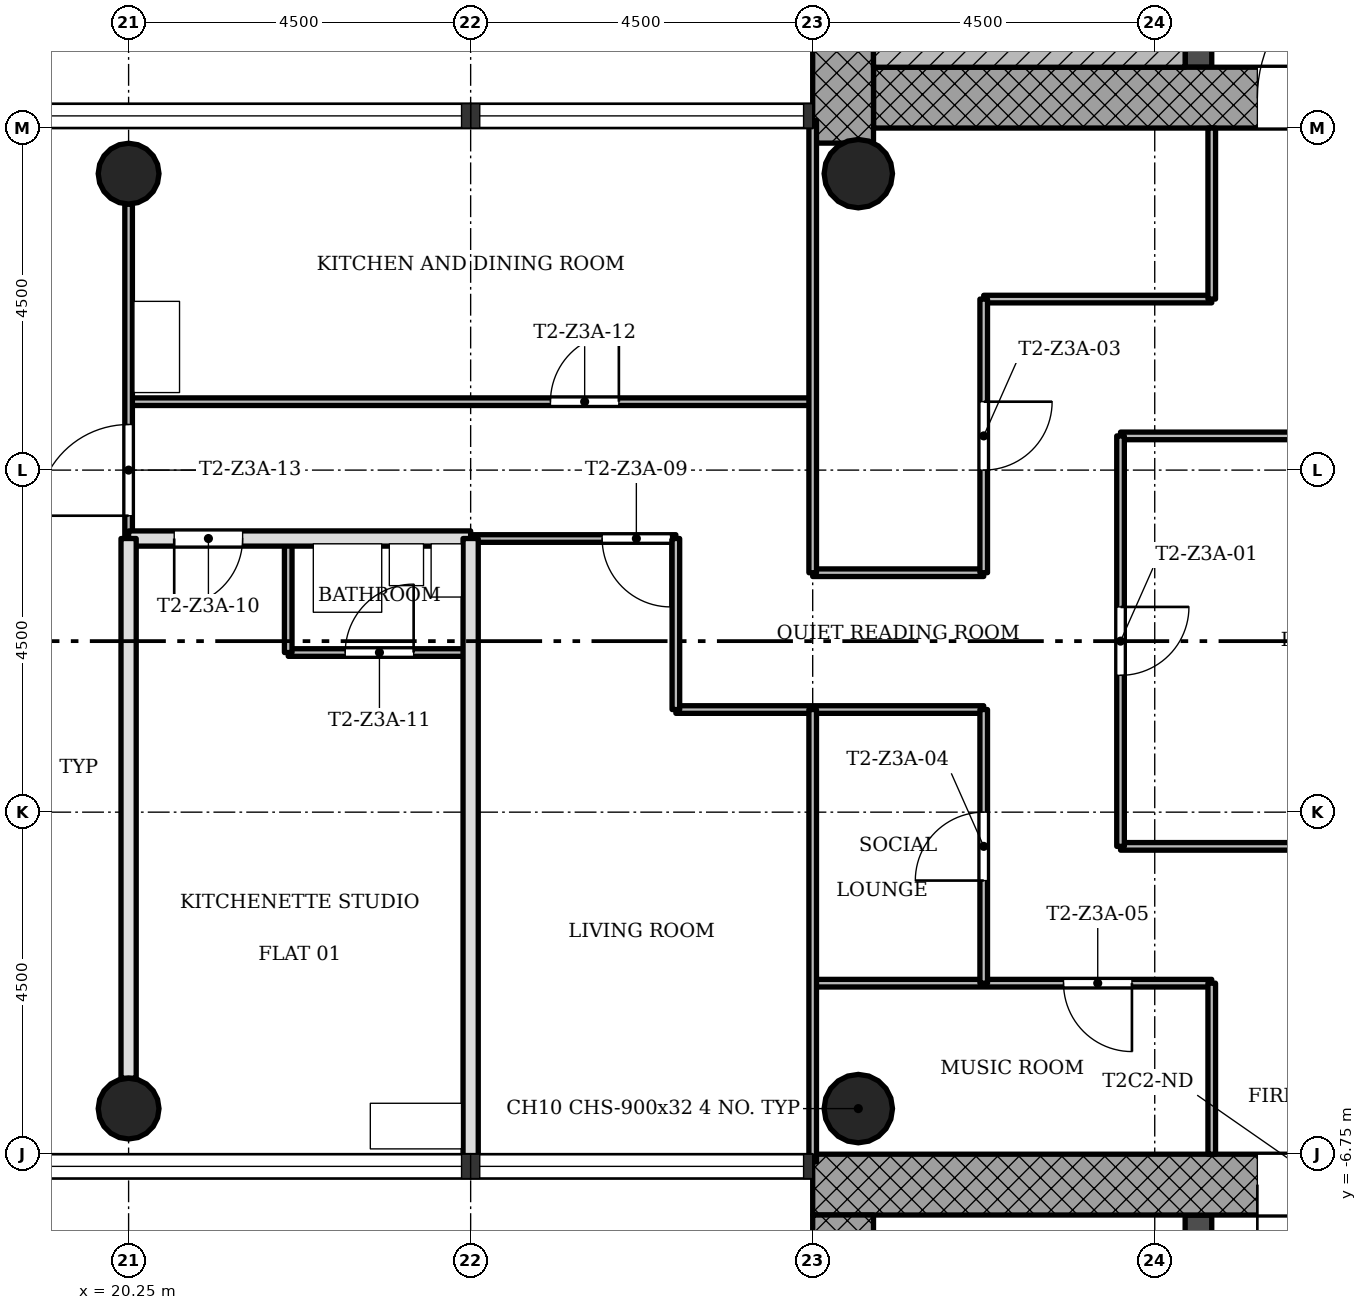
"""IFC4 building model, lengths in metres.
Left out: names, types, materials, properties, quantities, classifications, styles, units other than length and angle.
Written with IfcOpenShell. Run it as: python <this file> out.ifc"""

import sys

from ifc_helpers import new_model, si_unit, direction, frame, frame_2d, origin, origin_2d, place, context, subcontext, project, spatial, rectangle, hollow_circle, extrude, element, fill, save


model = new_model("IFC4")
c1 = context("Model", 3, precision=1e-05, world=origin(), true_north=direction((0.0, 1.0)))
c2 = subcontext(c1, "Body", "Model", "MODEL_VIEW")
j1 = project(units=[si_unit("LENGTHUNIT", "METRE"), si_unit("PLANEANGLEUNIT", "RADIAN")], contexts=[c1])
p1 = place(None, origin())
s1 = spatial("IfcSite", under=j1, at=p1, CompositionType="ELEMENT")
p2 = place(p1, origin())
s2 = spatial("IfcBuilding", under=s1, at=p2, CompositionType="ELEMENT")
p3 = place(p2, frame((0.0, 0.0, 133.7)))
s3 = spatial("IfcBuildingStorey", under=s2, at=p3, CompositionType="ELEMENT", Elevation=133.7)
p4 = place(p3, frame((30.05, 7.15, 0.0), z_axis=(0.0, 0.0, 1.0), x_axis=(1.0, 0.0, 0.0)))
e1 = element("IfcWall", 1, at=p4, inside=s3, PredefinedType="SHEAR", context=c2, shape_type="SweptSolid", body=[
    extrude(rectangle(XDim=12.7, YDim=0.8, at=frame_2d((6.35, 0.0))), origin(), (0.0, 0.0, 1.0), 3.4),
])
p5 = place(p4, frame((5.05, 0.0, 0.0)))
e2 = element("IfcOpeningElement", 2, at=p5, cuts=e1, PredefinedType="OPENING", context=c2, shape_type="SweptSolid", body=[
    extrude(rectangle(XDim=1.8, YDim=2.1, at=frame_2d((0.9, 1.05))), frame((0.0, 0.41, 0.0), z_axis=(0.0, -1.0, 0.0), x_axis=(1.0, 0.0, 0.0)), (0.0, 0.0, 1.0), 0.82),
])
p6 = place(p3, frame((29.65, 15.348, 0.0), z_axis=(0.0, 0.0, 1.0), x_axis=(0.0, -1.0, 0.0)))
e3 = element("IfcWall", 3, at=p6, inside=s3, PredefinedType="SHEAR", context=c2, shape_type="SweptSolid", body=[
    extrude(rectangle(XDim=8.796, YDim=0.8, at=frame_2d((4.398, 0.0))), origin(), (0.0, 0.0, 1.0), 3.4),
])
p7 = place(p3, frame((34.325, 7.55, 0.0), z_axis=(0.0, 0.0, 1.0), x_axis=(0.0, 1.0, 0.0)))
e4 = element("IfcWall", 4, at=p7, inside=s3, PredefinedType="SHEAR", context=c2, shape_type="SweptSolid", body=[
    extrude(rectangle(XDim=7.4, YDim=0.35, at=frame_2d((3.7, 0.0))), origin(), (0.0, 0.0, 1.0), 3.4),
])
p8 = place(p7, frame((0.85, 0.0, 0.0)))
e5 = element("IfcOpeningElement", 5, at=p8, cuts=e4, PredefinedType="OPENING", context=c2, shape_type="SweptSolid", body=[
    extrude(rectangle(XDim=0.9, YDim=2.1, at=frame_2d((0.45, 1.05))), frame((0.0, 0.185, 0.0), z_axis=(0.0, -1.0, 0.0), x_axis=(1.0, 0.0, 0.0)), (0.0, 0.0, 1.0), 0.37),
])
p9 = place(p3, frame((41.95, -7.15, 0.0), z_axis=(0.0, 0.0, 1.0), x_axis=(-1.0, 0.0, 0.0)))
e6 = element("IfcWall", 6, at=p9, inside=s3, PredefinedType="SHEAR", context=c2, shape_type="SweptSolid", body=[
    extrude(rectangle(XDim=12.7, YDim=0.8, at=frame_2d((6.35, 0.0))), origin(), (0.0, 0.0, 1.0), 3.4),
])
p10 = place(p9, frame((5.05, 0.0, 0.0)))
e7 = element("IfcOpeningElement", 7, at=p10, cuts=e6, PredefinedType="OPENING", context=c2, shape_type="SweptSolid", body=[
    extrude(rectangle(XDim=1.8, YDim=2.1, at=frame_2d((0.9, 1.05))), frame((0.0, 0.41, 0.0), z_axis=(0.0, -1.0, 0.0), x_axis=(1.0, 0.0, 0.0)), (0.0, 0.0, 1.0), 0.82),
])
p11 = place(p3, frame((29.65, -7.55, 0.0), z_axis=(0.0, 0.0, 1.0), x_axis=(0.0, -1.0, 0.0)))
e8 = element("IfcWall", 8, at=p11, inside=s3, PredefinedType="SHEAR", context=c2, shape_type="SweptSolid", body=[
    extrude(rectangle(XDim=8.2, YDim=0.8, at=frame_2d((4.1, 0.0))), origin(), (0.0, 0.0, 1.0), 3.4),
])
p12 = place(p3, frame((34.325, -14.95, 0.0), z_axis=(0.0, 0.0, 1.0), x_axis=(0.0, 1.0, 0.0)))
e9 = element("IfcWall", 9, at=p12, inside=s3, PredefinedType="SHEAR", context=c2, shape_type="SweptSolid", body=[
    extrude(rectangle(XDim=7.4, YDim=0.35, at=frame_2d((3.7, 0.0))), origin(), (0.0, 0.0, 1.0), 3.4),
])
p13 = place(p12, frame((5.35, 0.0, 0.0)))
e10 = element("IfcOpeningElement", 10, at=p13, cuts=e9, PredefinedType="OPENING", context=c2, shape_type="SweptSolid", body=[
    extrude(rectangle(XDim=1.1, YDim=2.1, at=frame_2d((0.55, 1.05))), frame((0.0, 0.185, 0.0), z_axis=(0.0, -1.0, 0.0), x_axis=(1.0, 0.0, 0.0)), (0.0, 0.0, 1.0), 0.37),
])
p14 = place(p12, frame((1.0, 0.0, 0.0)))
e11 = element("IfcOpeningElement", 11, at=p14, cuts=e9, PredefinedType="OPENING", context=c2, shape_type="SweptSolid", body=[
    extrude(rectangle(XDim=1.1, YDim=2.1, at=frame_2d((0.55, 1.05))), frame((0.0, 0.185, 0.0), z_axis=(0.0, -1.0, 0.0), x_axis=(1.0, 0.0, 0.0)), (0.0, 0.0, 1.0), 0.37),
])
for number, where, z_axis, x_axis in (
    (12, (20.25, 6.15, 0.0), (0.0, 0.0, 1.0), (1.0, 0.0, 0.0)),
    (13, (20.25, -6.15, 0.0), (0.0, 0.0, 1.0), (1.0, 0.0, 0.0)),
):
    element("IfcColumn", number, at=place(p3, frame(where, z_axis=z_axis, x_axis=x_axis)), inside=s3, PredefinedType="COLUMN", context=c2, shape_type="SweptSolid", body=[
        extrude(hollow_circle(Radius=0.4, WallThickness=0.028, at=origin_2d()), origin(), (0.0, 0.0, 1.0), 3.4),
    ])
for number, where, z_axis, x_axis in (
    (14, (29.85, 6.15, 0.0), (0.0, 0.0, 1.0), (1.0, 0.0, 0.0)),
    (15, (29.85, -6.15, 0.0), (0.0, 0.0, 1.0), (1.0, 0.0, 0.0)),
):
    element("IfcColumn", number, at=place(p3, frame(where, z_axis=z_axis, x_axis=x_axis)), inside=s3, PredefinedType="COLUMN", context=c2, shape_type="SweptSolid", body=[
        extrude(hollow_circle(Radius=0.45, WallThickness=0.032, at=origin_2d()), origin(), (0.0, 0.0, 1.0), 3.4),
    ])
p15 = place(p3, frame((34.5, -4.5, 0.0), z_axis=(0.0, 0.0, 1.0), x_axis=(-1.0, 0.0, 0.0)))
e16 = element("IfcWall", 16, at=p15, inside=s3, PredefinedType="PARTITIONING", context=c2, shape_type="SweptSolid", body=[
    extrude(rectangle(XDim=5.25, YDim=0.1, at=frame_2d((2.625, 0.0))), origin(), (0.0, 0.0, 1.0), 3.0),
])
p16 = place(p15, frame((1.05, 0.0, 0.0)))
e17 = element("IfcOpeningElement", 17, at=p16, cuts=e16, PredefinedType="OPENING", context=c2, shape_type="SweptSolid", body=[
    extrude(rectangle(XDim=0.9, YDim=2.1, at=frame_2d((0.45, 1.05))), frame((0.0, 0.06, 0.0), z_axis=(0.0, -1.0, 0.0), x_axis=(1.0, 0.0, 0.0)), (0.0, 0.0, 1.0), 0.12),
])
p17 = place(p3, frame((38.7, -2.7, 0.0), z_axis=(0.0, 0.0, 1.0), x_axis=(-1.0, 0.0, 0.0)))
e18 = element("IfcWall", 18, at=p17, inside=s3, PredefinedType="PARTITIONING", context=c2, shape_type="SweptSolid", body=[
    extrude(rectangle(XDim=5.4, YDim=0.1, at=frame_2d((2.7, 0.0))), origin(), (0.0, 0.0, 1.0), 3.0),
])
p18 = place(p3, frame((31.5, -0.9, 0.0), z_axis=(0.0, 0.0, 1.0), x_axis=(-1.0, 0.0, 0.0)))
e19 = element("IfcWall", 19, at=p18, inside=s3, PredefinedType="PARTITIONING", context=c2, shape_type="SweptSolid", body=[
    extrude(rectangle(XDim=4.05, YDim=0.1, at=frame_2d((2.025, 0.0))), origin(), (0.0, 0.0, 1.0), 3.0),
])
p19 = place(p3, frame((24.75, -0.15, 0.0), z_axis=(0.0, 0.0, 1.0), x_axis=(-1.0, 0.0, 0.0)))
e20 = element("IfcWall", 20, at=p19, inside=s3, PredefinedType="PARTITIONING", context=c2, shape_type="SweptSolid", body=[
    extrude(rectangle(XDim=2.4, YDim=0.1, at=frame_2d((1.2, 0.0))), origin(), (0.0, 0.0, 1.0), 3.0),
])
p20 = place(p19, frame((0.75, 0.0, 0.0)))
e21 = element("IfcOpeningElement", 21, at=p20, cuts=e20, PredefinedType="OPENING", context=c2, shape_type="SweptSolid", body=[
    extrude(rectangle(XDim=0.9, YDim=2.1, at=frame_2d((0.45, 1.05))), frame((0.0, 0.06, 0.0), z_axis=(0.0, -1.0, 0.0), x_axis=(1.0, 0.0, 0.0)), (0.0, 0.0, 1.0), 0.12),
])
p21 = place(p3, frame((31.5, 0.9, 0.0), z_axis=(0.0, 0.0, 1.0), x_axis=(-1.0, 0.0, 0.0)))
e22 = element("IfcWall", 22, at=p21, inside=s3, PredefinedType="PARTITIONING", context=c2, shape_type="SweptSolid", body=[
    extrude(rectangle(XDim=2.25, YDim=0.1, at=frame_2d((1.125, 0.0))), origin(), (0.0, 0.0, 1.0), 3.0),
])
p22 = place(p3, frame((27.45, 1.35, 0.0), z_axis=(0.0, 0.0, 1.0), x_axis=(-1.0, 0.0, 0.0)))
e23 = element("IfcWall", 23, at=p22, inside=s3, PredefinedType="PARTITIONING", context=c2, shape_type="SweptSolid", body=[
    extrude(rectangle(XDim=2.7, YDim=0.1, at=frame_2d((1.35, 0.0))), origin(), (0.0, 0.0, 1.0), 3.0),
])
p23 = place(p22, frame((0.07, 0.0, 0.0)))
e24 = element("IfcOpeningElement", 24, at=p23, cuts=e23, PredefinedType="OPENING", context=c2, shape_type="SweptSolid", body=[
    extrude(rectangle(XDim=0.9, YDim=2.1, at=frame_2d((0.45, 1.05))), frame((0.0, 0.06, 0.0), z_axis=(0.0, -1.0, 0.0), x_axis=(1.0, 0.0, 0.0)), (0.0, 0.0, 1.0), 0.12),
])
p24 = place(p3, frame((24.75, 1.35, 0.0), z_axis=(0.0, 0.0, 1.0), x_axis=(-1.0, 0.0, 0.0)))
e25 = element("IfcWall", 25, at=p24, inside=s3, PredefinedType="SOLIDWALL", context=c2, shape_type="SweptSolid", body=[
    extrude(rectangle(XDim=4.5, YDim=0.2, at=frame_2d((2.25, 0.0))), origin(), (0.0, 0.0, 1.0), 3.0),
])
p25 = place(p24, frame((3.0, 0.0, 0.0)))
e26 = element("IfcOpeningElement", 26, at=p25, cuts=e25, PredefinedType="OPENING", context=c2, shape_type="SweptSolid", body=[
    extrude(rectangle(XDim=0.9, YDim=2.1, at=frame_2d((0.45, 1.05))), frame((0.0, 0.11, 0.0), z_axis=(0.0, -1.0, 0.0), x_axis=(1.0, 0.0, 0.0)), (0.0, 0.0, 1.0), 0.22),
])
p26 = place(p3, frame((38.7, 2.7, 0.0), z_axis=(0.0, 0.0, 1.0), x_axis=(-1.0, 0.0, 0.0)))
e27 = element("IfcWall", 27, at=p26, inside=s3, PredefinedType="PARTITIONING", context=c2, shape_type="SweptSolid", body=[
    extrude(rectangle(XDim=5.4, YDim=0.1, at=frame_2d((2.7, 0.0))), origin(), (0.0, 0.0, 1.0), 3.0),
])
p27 = place(p3, frame((29.25, 3.15, 0.0), z_axis=(0.0, 0.0, 1.0), x_axis=(-1.0, 0.0, 0.0)))
e28 = element("IfcWall", 28, at=p27, inside=s3, PredefinedType="PARTITIONING", context=c2, shape_type="SweptSolid", body=[
    extrude(rectangle(XDim=9.0, YDim=0.1, at=frame_2d((4.5, 0.0))), origin(), (0.0, 0.0, 1.0), 3.0),
])
p28 = place(p27, frame((2.55, 0.0, 0.0)))
e29 = element("IfcOpeningElement", 29, at=p28, cuts=e28, PredefinedType="OPENING", context=c2, shape_type="SweptSolid", body=[
    extrude(rectangle(XDim=0.9, YDim=2.1, at=frame_2d((0.45, 1.05))), frame((0.0, 0.06, 0.0), z_axis=(0.0, -1.0, 0.0), x_axis=(1.0, 0.0, 0.0)), (0.0, 0.0, 1.0), 0.12),
])
p29 = place(p3, frame((34.5, 4.5, 0.0), z_axis=(0.0, 0.0, 1.0), x_axis=(-1.0, 0.0, 0.0)))
e30 = element("IfcWall", 30, at=p29, inside=s3, PredefinedType="PARTITIONING", context=c2, shape_type="SweptSolid", body=[
    extrude(rectangle(XDim=3.0, YDim=0.1, at=frame_2d((1.5, 0.0))), origin(), (0.0, 0.0, 1.0), 3.0),
])
for number, where, z_axis, x_axis in (
    (31, (34.5, -6.75, 0.0), (0.0, 0.0, 1.0), (0.0, 1.0, 0.0)),
    (32, (34.5, 4.5, 0.0), (0.0, 0.0, 1.0), (0.0, 1.0, 0.0)),
):
    element("IfcWall", number, at=place(p3, frame(where, z_axis=z_axis, x_axis=x_axis)), inside=s3, PredefinedType="PARTITIONING", context=c2, shape_type="SweptSolid", body=[
        extrude(rectangle(XDim=2.25, YDim=0.1, at=frame_2d((1.125, 0.0))), origin(), (0.0, 0.0, 1.0), 3.0),
    ])
p30 = place(p3, frame((33.3, -2.7, 0.0), z_axis=(0.0, 0.0, 1.0), x_axis=(0.0, 1.0, 0.0)))
e33 = element("IfcWall", 33, at=p30, inside=s3, PredefinedType="PARTITIONING", context=c2, shape_type="SweptSolid", body=[
    extrude(rectangle(XDim=5.4, YDim=0.1, at=frame_2d((2.7, 0.0))), origin(), (0.0, 0.0, 1.0), 3.0),
])
p31 = place(p30, frame((2.25, 0.0, 0.0)))
e34 = element("IfcOpeningElement", 34, at=p31, cuts=e33, PredefinedType="OPENING", context=c2, shape_type="SweptSolid", body=[
    extrude(rectangle(XDim=0.9, YDim=2.1, at=frame_2d((0.45, 1.05))), frame((0.0, 0.06, 0.0), z_axis=(0.0, -1.0, 0.0), x_axis=(1.0, 0.0, 0.0)), (0.0, 0.0, 1.0), 0.12),
])
p32 = place(p3, frame((31.5, -4.5, 0.0), z_axis=(0.0, 0.0, 1.0), x_axis=(0.0, 1.0, 0.0)))
e35 = element("IfcWall", 35, at=p32, inside=s3, PredefinedType="PARTITIONING", context=c2, shape_type="SweptSolid", body=[
    extrude(rectangle(XDim=3.6, YDim=0.1, at=frame_2d((1.8, 0.0))), origin(), (0.0, 0.0, 1.0), 3.0),
])
p33 = place(p32, frame((1.35, 0.0, 0.0)))
e36 = element("IfcOpeningElement", 36, at=p33, cuts=e35, PredefinedType="OPENING", context=c2, shape_type="SweptSolid", body=[
    extrude(rectangle(XDim=0.9, YDim=2.1, at=frame_2d((0.45, 1.05))), frame((0.0, 0.06, 0.0), z_axis=(0.0, -1.0, 0.0), x_axis=(1.0, 0.0, 0.0)), (0.0, 0.0, 1.0), 0.12),
])
p34 = place(p3, frame((31.5, 0.9, 0.0), z_axis=(0.0, 0.0, 1.0), x_axis=(0.0, 1.0, 0.0)))
e37 = element("IfcWall", 37, at=p34, inside=s3, PredefinedType="PARTITIONING", context=c2, shape_type="SweptSolid", body=[
    extrude(rectangle(XDim=3.6, YDim=0.1, at=frame_2d((1.8, 0.0))), origin(), (0.0, 0.0, 1.0), 3.0),
])
p35 = place(p34, frame((1.35, 0.0, 0.0)))
e38 = element("IfcOpeningElement", 38, at=p35, cuts=e37, PredefinedType="OPENING", context=c2, shape_type="SweptSolid", body=[
    extrude(rectangle(XDim=0.9, YDim=2.1, at=frame_2d((0.45, 1.05))), frame((0.0, 0.06, 0.0), z_axis=(0.0, -1.0, 0.0), x_axis=(1.0, 0.0, 0.0)), (0.0, 0.0, 1.0), 0.12),
])
for number, where, z_axis, x_axis in (
    (39, (29.25, -6.85, 0.0), (0.0, 0.0, 1.0), (0.0, 1.0, 0.0)),
    (40, (29.25, 0.9, 0.0), (0.0, 0.0, 1.0), (0.0, 1.0, 0.0)),
):
    element("IfcWall", number, at=place(p3, frame(where, z_axis=z_axis, x_axis=x_axis)), inside=s3, PredefinedType="PARTITIONING", context=c2, shape_type="SweptSolid", body=[
        extrude(rectangle(XDim=5.95, YDim=0.1, at=frame_2d((2.975, 0.0))), origin(), (0.0, 0.0, 1.0), 3.0),
    ])
p36 = place(p3, frame((27.45, -0.9, 0.0), z_axis=(0.0, 0.0, 1.0), x_axis=(0.0, 1.0, 0.0)))
e41 = element("IfcWall", 41, at=p36, inside=s3, PredefinedType="PARTITIONING", context=c2, shape_type="SweptSolid", body=[
    extrude(rectangle(XDim=2.25, YDim=0.1, at=frame_2d((1.125, 0.0))), origin(), (0.0, 0.0, 1.0), 3.0),
])
p37 = place(p3, frame((24.75, -6.85, 0.0), z_axis=(0.0, 0.0, 1.0), x_axis=(0.0, 1.0, 0.0)))
e42 = element("IfcWall", 42, at=p37, inside=s3, PredefinedType="SOLIDWALL", context=c2, shape_type="SweptSolid", body=[
    extrude(rectangle(XDim=8.2, YDim=0.2, at=frame_2d((4.1, 0.0))), origin(), (0.0, 0.0, 1.0), 3.0),
])
p38 = place(p3, frame((22.35, -0.15, 0.0), z_axis=(0.0, 0.0, 1.0), x_axis=(0.0, 1.0, 0.0)))
e43 = element("IfcWall", 43, at=p38, inside=s3, PredefinedType="PARTITIONING", context=c2, shape_type="SweptSolid", body=[
    extrude(rectangle(XDim=1.5, YDim=0.1, at=frame_2d((0.75, 0.0))), origin(), (0.0, 0.0, 1.0), 3.0),
])
p39 = place(p3, frame((20.25, 1.35, 0.0), z_axis=(0.0, 0.0, 1.0), x_axis=(0.0, 1.0, 0.0)))
e44 = element("IfcWall", 44, at=p39, inside=s3, PredefinedType="PARTITIONING", context=c2, shape_type="SweptSolid", body=[
    extrude(rectangle(XDim=4.4, YDim=0.1, at=frame_2d((2.2, 0.0))), origin(), (0.0, 0.0, 1.0), 3.0),
])
p40 = place(p39, frame((0.3, 0.0, 0.0)))
e45 = element("IfcOpeningElement", 45, at=p40, cuts=e44, PredefinedType="OPENING", context=c2, shape_type="SweptSolid", body=[
    extrude(rectangle(XDim=1.2, YDim=2.1, at=frame_2d((0.6, 1.05))), frame((0.0, 0.06, 0.0), z_axis=(0.0, -1.0, 0.0), x_axis=(1.0, 0.0, 0.0)), (0.0, 0.0, 1.0), 0.12),
])
p41 = place(p3, frame((20.25, -5.75, 0.0), z_axis=(0.0, 0.0, 1.0), x_axis=(0.0, 1.0, 0.0)))
e46 = element("IfcWall", 46, at=p41, inside=s3, PredefinedType="SOLIDWALL", context=c2, shape_type="SweptSolid", body=[
    extrude(rectangle(XDim=7.1, YDim=0.2, at=frame_2d((3.55, 0.0))), origin(), (0.0, 0.0, 1.0), 3.0),
])
p42 = place(p3, frame((34.15, 7.75, 0.0), z_axis=(0.0, 0.0, 1.0), x_axis=(-1.0, 0.0, 0.0)))
e47 = element("IfcWall", 47, at=p42, inside=s3, PredefinedType="SHEAR", context=c2, shape_type="SweptSolid", body=[
    extrude(rectangle(XDim=4.1, YDim=0.4, at=frame_2d((2.05, 0.0))), origin(), (0.0, 0.0, 1.0), 3.4),
])
p43 = place(p31, origin())
e48 = element("IfcDoor", 48, at=p43, inside=s3, OperationType="SINGLE_SWING_RIGHT", PredefinedType="DOOR", context=c2, shape_type="SweptSolid", body=[
    extrude(rectangle(XDim=0.9, YDim=2.1, at=frame_2d((0.45, 1.05))), frame((0.0, 0.025, 0.0), z_axis=(0.0, -1.0, 0.0), x_axis=(1.0, 0.0, 0.0)), (0.0, 0.0, 1.0), 0.05),
])
fill(e34, e48)
p44 = place(p35, origin())
e49 = element("IfcDoor", 49, at=p44, inside=s3, OperationType="SINGLE_SWING_RIGHT", PredefinedType="DOOR", context=c2, shape_type="SweptSolid", body=[
    extrude(rectangle(XDim=0.9, YDim=2.1, at=frame_2d((0.45, 1.05))), frame((0.0, 0.025, 0.0), z_axis=(0.0, -1.0, 0.0), x_axis=(1.0, 0.0, 0.0)), (0.0, 0.0, 1.0), 0.05),
])
fill(e38, e49)
p45 = place(p33, origin())
e50 = element("IfcDoor", 50, at=p45, inside=s3, OperationType="SINGLE_SWING_RIGHT", PredefinedType="DOOR", context=c2, shape_type="SweptSolid", body=[
    extrude(rectangle(XDim=0.9, YDim=2.1, at=frame_2d((0.45, 1.05))), frame((0.0, 0.025, 0.0), z_axis=(0.0, -1.0, 0.0), x_axis=(1.0, 0.0, 0.0)), (0.0, 0.0, 1.0), 0.05),
])
fill(e36, e50)
p46 = place(p16, origin())
e51 = element("IfcDoor", 51, at=p46, inside=s3, OperationType="SINGLE_SWING_RIGHT", PredefinedType="DOOR", context=c2, shape_type="SweptSolid", body=[
    extrude(rectangle(XDim=0.9, YDim=2.1, at=frame_2d((0.45, 1.05))), frame((0.0, 0.025, 0.0), z_axis=(0.0, -1.0, 0.0), x_axis=(1.0, 0.0, 0.0)), (0.0, 0.0, 1.0), 0.05),
])
fill(e17, e51)
p47 = place(p23, origin())
e52 = element("IfcDoor", 52, at=p47, inside=s3, OperationType="SINGLE_SWING_RIGHT", PredefinedType="DOOR", context=c2, shape_type="SweptSolid", body=[
    extrude(rectangle(XDim=0.9, YDim=2.1, at=frame_2d((0.45, 1.05))), frame((0.0, 0.025, 0.0), z_axis=(0.0, -1.0, 0.0), x_axis=(1.0, 0.0, 0.0)), (0.0, 0.0, 1.0), 0.05),
])
fill(e24, e52)
p48 = place(p25, origin())
e53 = element("IfcDoor", 53, at=p48, inside=s3, OperationType="SINGLE_SWING_LEFT", PredefinedType="DOOR", context=c2, shape_type="SweptSolid", body=[
    extrude(rectangle(XDim=0.9, YDim=2.1, at=frame_2d((0.45, 1.05))), frame((0.0, 0.025, 0.0), z_axis=(0.0, -1.0, 0.0), x_axis=(1.0, 0.0, 0.0)), (0.0, 0.0, 1.0), 0.05),
])
fill(e26, e53)
p49 = place(p20, origin())
e54 = element("IfcDoor", 54, at=p49, inside=s3, OperationType="SINGLE_SWING_LEFT", PredefinedType="DOOR", context=c2, shape_type="SweptSolid", body=[
    extrude(rectangle(XDim=0.9, YDim=2.1, at=frame_2d((0.45, 1.05))), frame((0.0, 0.025, 0.0), z_axis=(0.0, -1.0, 0.0), x_axis=(1.0, 0.0, 0.0)), (0.0, 0.0, 1.0), 0.05),
])
fill(e21, e54)
p50 = place(p28, origin())
e55 = element("IfcDoor", 55, at=p50, inside=s3, OperationType="SINGLE_SWING_LEFT", PredefinedType="DOOR", context=c2, shape_type="SweptSolid", body=[
    extrude(rectangle(XDim=0.9, YDim=2.1, at=frame_2d((0.45, 1.05))), frame((0.0, 0.025, 0.0), z_axis=(0.0, -1.0, 0.0), x_axis=(1.0, 0.0, 0.0)), (0.0, 0.0, 1.0), 0.05),
])
fill(e29, e55)
p51 = place(p40, origin())
e56 = element("IfcDoor", 56, at=p51, inside=s3, OperationType="SINGLE_SWING_RIGHT", PredefinedType="DOOR", context=c2, shape_type="SweptSolid", body=[
    extrude(rectangle(XDim=1.2, YDim=2.1, at=frame_2d((0.6, 1.05))), frame((0.0, 0.025, 0.0), z_axis=(0.0, -1.0, 0.0), x_axis=(1.0, 0.0, 0.0)), (0.0, 0.0, 1.0), 0.05),
])
fill(e45, e56)
p52 = place(p5, origin())
e57 = element("IfcDoor", 57, at=p52, inside=s3, OperationType="SINGLE_SWING_LEFT", PredefinedType="DOOR", context=c2, shape_type="SweptSolid", body=[
    extrude(rectangle(XDim=1.8, YDim=2.1, at=frame_2d((0.9, 1.05))), frame((0.0, 0.025, 0.0), z_axis=(0.0, -1.0, 0.0), x_axis=(1.0, 0.0, 0.0)), (0.0, 0.0, 1.0), 0.05),
])
fill(e2, e57)
p53 = place(p10, origin())
e58 = element("IfcDoor", 58, at=p53, inside=s3, OperationType="SINGLE_SWING_LEFT", PredefinedType="DOOR", context=c2, shape_type="SweptSolid", body=[
    extrude(rectangle(XDim=1.8, YDim=2.1, at=frame_2d((0.9, 1.05))), frame((0.0, 0.025, 0.0), z_axis=(0.0, -1.0, 0.0), x_axis=(1.0, 0.0, 0.0)), (0.0, 0.0, 1.0), 0.05),
])
fill(e7, e58)
save(model, sys.argv[1])
